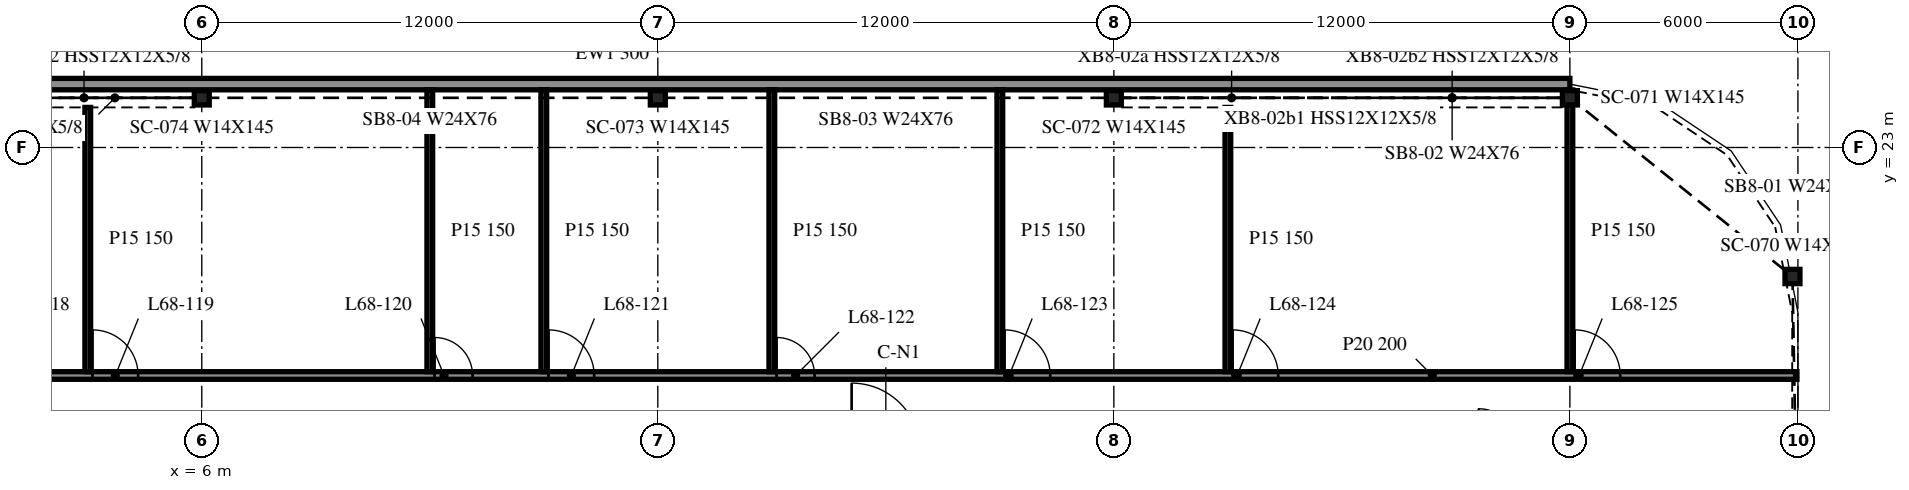
"""IFC4 building model, lengths in metres.
Left out: names, types, materials, properties, quantities, classifications, styles, units other than length and angle.
Written with IfcOpenShell. Run it as: python <this file> out.ifc"""

import sys

from ifc_helpers import new_model, si_unit, direction, frame, frame_2d, origin, origin_2d, place, context, subcontext, project, spatial, rectangle, i_section, extrude, element, fill, save


model = new_model("IFC4")
c1 = context("Model", 3, precision=1e-05, world=origin(), true_north=direction((0.0, 1.0)))
c2 = subcontext(c1, "Body", "Model", "MODEL_VIEW")
j1 = project(units=[si_unit("LENGTHUNIT", "METRE"), si_unit("PLANEANGLEUNIT", "RADIAN")], contexts=[c1])
p1 = place(None, origin())
s1 = spatial("IfcSite", under=j1, at=p1, CompositionType="ELEMENT")
p2 = place(p1, origin())
s2 = spatial("IfcBuilding", under=s1, at=p2, CompositionType="ELEMENT")
p3 = place(p2, frame((0.0, 0.0, 278.5)))
s3 = spatial("IfcBuildingStorey", under=s2, at=p3, CompositionType="ELEMENT", Elevation=278.5)
for number, where, z_axis, x_axis in (
    (1, (47.857, 19.605, -0.34), (0.0, 0.0, 1.0), (1.0, 0.0, 0.0)),
    (2, (42.0, 24.307, -0.34), (0.0, 0.0, 1.0), (1.0, 0.0, 0.0)),
    (3, (30.0, 24.307, -0.34), (0.0, 0.0, 1.0), (1.0, 0.0, 0.0)),
    (4, (18.0, 24.307, -0.34), (0.0, 0.0, 1.0), (1.0, 0.0, 0.0)),
    (5, (6.0, 24.307, -0.34), (0.0, 0.0, 1.0), (1.0, 0.0, 0.0)),
):
    element("IfcColumn", number, at=place(p3, frame(where, z_axis=z_axis, x_axis=x_axis)), inside=s3, PredefinedType="COLUMN", context=c2, shape_type="SweptSolid", body=[
        extrude(i_section(OverallWidth=0.394, OverallDepth=0.376, WebThickness=0.017, FlangeThickness=0.028, at=origin_2d()), origin(), (0.0, 0.0, 1.0), 3.8),
    ])
p4 = place(p3, frame((42.0, 24.668, 0.0), z_axis=(0.0, 0.0, 1.0), x_axis=(-1.0, 0.0, 0.0)))
e6 = element("IfcWall", 6, at=p4, inside=s3, PredefinedType="NOTDEFINED", context=c2, shape_type="SweptSolid", body=[
    extrude(rectangle(XDim=84.0, YDim=0.3, at=frame_2d((42.0, 0.0))), origin(), (0.0, 0.0, 1.0), 2.853),
])
p5 = place(p3, frame((-47.975, 17.0, 0.0), z_axis=(0.0, 0.0, 1.0), x_axis=(1.0, 0.0, 0.0)))
e7 = element("IfcWall", 7, at=p5, inside=s3, PredefinedType="PARTITIONING", context=c2, shape_type="SweptSolid", body=[
    extrude(rectangle(XDim=95.95, YDim=0.2, at=frame_2d((47.975, 0.0))), origin(), (0.0, 0.0, 1.0), 3.46),
])
p6 = place(p5, frame((7.3, 0.0, 0.0)))
e8 = element("IfcOpeningElement", 8, at=p6, cuts=e7, PredefinedType="OPENING", context=c2, shape_type="SweptSolid", body=[
    extrude(rectangle(XDim=1.2, YDim=2.1, at=frame_2d((0.6, 1.05))), frame((0.0, 0.11, 0.0), z_axis=(0.0, -1.0, 0.0), x_axis=(1.0, 0.0, 0.0)), (0.0, 0.0, 1.0), 0.22),
])
p7 = place(p5, frame((13.3, 0.0, 0.0)))
e9 = element("IfcOpeningElement", 9, at=p7, cuts=e7, PredefinedType="OPENING", context=c2, shape_type="SweptSolid", body=[
    extrude(rectangle(XDim=1.2, YDim=2.1, at=frame_2d((0.6, 1.05))), frame((0.0, 0.11, 0.0), z_axis=(0.0, -1.0, 0.0), x_axis=(1.0, 0.0, 0.0)), (0.0, 0.0, 1.0), 0.22),
])
p8 = place(p5, frame((19.3, 0.0, 0.0)))
e10 = element("IfcOpeningElement", 10, at=p8, cuts=e7, PredefinedType="OPENING", context=c2, shape_type="SweptSolid", body=[
    extrude(rectangle(XDim=1.2, YDim=2.1, at=frame_2d((0.6, 1.05))), frame((0.0, 0.11, 0.0), z_axis=(0.0, -1.0, 0.0), x_axis=(1.0, 0.0, 0.0)), (0.0, 0.0, 1.0), 0.22),
])
p9 = place(p5, frame((28.5, 0.0, 0.0)))
e11 = element("IfcOpeningElement", 11, at=p9, cuts=e7, PredefinedType="OPENING", context=c2, shape_type="SweptSolid", body=[
    extrude(rectangle(XDim=1.0, YDim=2.1, at=frame_2d((0.5, 1.05))), frame((0.0, 0.11, 0.0), z_axis=(0.0, -1.0, 0.0), x_axis=(1.0, 0.0, 0.0)), (0.0, 0.0, 1.0), 0.22),
])
p10 = place(p5, frame((31.3, 0.0, 0.0)))
e12 = element("IfcOpeningElement", 12, at=p10, cuts=e7, PredefinedType="OPENING", context=c2, shape_type="SweptSolid", body=[
    extrude(rectangle(XDim=1.2, YDim=2.1, at=frame_2d((0.6, 1.05))), frame((0.0, 0.11, 0.0), z_axis=(0.0, -1.0, 0.0), x_axis=(1.0, 0.0, 0.0)), (0.0, 0.0, 1.0), 0.22),
])
p11 = place(p5, frame((37.5, 0.0, 0.0)))
e13 = element("IfcOpeningElement", 13, at=p11, cuts=e7, PredefinedType="OPENING", context=c2, shape_type="SweptSolid", body=[
    extrude(rectangle(XDim=1.0, YDim=2.1, at=frame_2d((0.5, 1.05))), frame((0.0, 0.11, 0.0), z_axis=(0.0, -1.0, 0.0), x_axis=(1.0, 0.0, 0.0)), (0.0, 0.0, 1.0), 0.22),
])
p12 = place(p5, frame((43.3, 0.0, 0.0)))
e14 = element("IfcOpeningElement", 14, at=p12, cuts=e7, PredefinedType="OPENING", context=c2, shape_type="SweptSolid", body=[
    extrude(rectangle(XDim=1.2, YDim=2.1, at=frame_2d((0.6, 1.05))), frame((0.0, 0.11, 0.0), z_axis=(0.0, -1.0, 0.0), x_axis=(1.0, 0.0, 0.0)), (0.0, 0.0, 1.0), 0.22),
])
p13 = place(p5, frame((47.3, 0.0, 0.0)))
e15 = element("IfcOpeningElement", 15, at=p13, cuts=e7, PredefinedType="OPENING", context=c2, shape_type="SweptSolid", body=[
    extrude(rectangle(XDim=1.2, YDim=2.1, at=frame_2d((0.6, 1.05))), frame((0.0, 0.11, 0.0), z_axis=(0.0, -1.0, 0.0), x_axis=(1.0, 0.0, 0.0)), (0.0, 0.0, 1.0), 0.22),
])
p14 = place(p5, frame((51.1, 0.0, 0.0)))
e16 = element("IfcOpeningElement", 16, at=p14, cuts=e7, PredefinedType="OPENING", context=c2, shape_type="SweptSolid", body=[
    extrude(rectangle(XDim=1.2, YDim=2.1, at=frame_2d((0.6, 1.05))), frame((0.0, 0.11, 0.0), z_axis=(0.0, -1.0, 0.0), x_axis=(1.0, 0.0, 0.0)), (0.0, 0.0, 1.0), 0.22),
])
p15 = place(p5, frame((60.1, 0.0, 0.0)))
e17 = element("IfcOpeningElement", 17, at=p15, cuts=e7, PredefinedType="OPENING", context=c2, shape_type="SweptSolid", body=[
    extrude(rectangle(XDim=1.0, YDim=2.1, at=frame_2d((0.5, 1.05))), frame((0.0, 0.11, 0.0), z_axis=(0.0, -1.0, 0.0), x_axis=(1.0, 0.0, 0.0)), (0.0, 0.0, 1.0), 0.22),
])
p16 = place(p5, frame((63.1, 0.0, 0.0)))
e18 = element("IfcOpeningElement", 18, at=p16, cuts=e7, PredefinedType="OPENING", context=c2, shape_type="SweptSolid", body=[
    extrude(rectangle(XDim=1.2, YDim=2.1, at=frame_2d((0.6, 1.05))), frame((0.0, 0.11, 0.0), z_axis=(0.0, -1.0, 0.0), x_axis=(1.0, 0.0, 0.0)), (0.0, 0.0, 1.0), 0.22),
])
p17 = place(p5, frame((69.1, 0.0, 0.0)))
e19 = element("IfcOpeningElement", 19, at=p17, cuts=e7, PredefinedType="OPENING", context=c2, shape_type="SweptSolid", body=[
    extrude(rectangle(XDim=1.0, YDim=2.1, at=frame_2d((0.5, 1.05))), frame((0.0, 0.11, 0.0), z_axis=(0.0, -1.0, 0.0), x_axis=(1.0, 0.0, 0.0)), (0.0, 0.0, 1.0), 0.22),
])
p18 = place(p5, frame((75.1, 0.0, 0.0)))
e20 = element("IfcOpeningElement", 20, at=p18, cuts=e7, PredefinedType="OPENING", context=c2, shape_type="SweptSolid", body=[
    extrude(rectangle(XDim=1.2, YDim=2.1, at=frame_2d((0.6, 1.05))), frame((0.0, 0.11, 0.0), z_axis=(0.0, -1.0, 0.0), x_axis=(1.0, 0.0, 0.0)), (0.0, 0.0, 1.0), 0.22),
])
p19 = place(p5, frame((81.1, 0.0, 0.0)))
e21 = element("IfcOpeningElement", 21, at=p19, cuts=e7, PredefinedType="OPENING", context=c2, shape_type="SweptSolid", body=[
    extrude(rectangle(XDim=1.2, YDim=2.1, at=frame_2d((0.6, 1.05))), frame((0.0, 0.11, 0.0), z_axis=(0.0, -1.0, 0.0), x_axis=(1.0, 0.0, 0.0)), (0.0, 0.0, 1.0), 0.22),
])
p20 = place(p5, frame((90.1, 0.0, 0.0)))
e22 = element("IfcOpeningElement", 22, at=p20, cuts=e7, PredefinedType="OPENING", context=c2, shape_type="SweptSolid", body=[
    extrude(rectangle(XDim=1.2, YDim=2.1, at=frame_2d((0.6, 1.05))), frame((0.0, 0.11, 0.0), z_axis=(0.0, -1.0, 0.0), x_axis=(1.0, 0.0, 0.0)), (0.0, 0.0, 1.0), 0.22),
])
p21 = place(p3, frame((3.0, 17.1, 0.0), z_axis=(0.0, 0.0, 1.0), x_axis=(0.0, 1.0, 0.0)))
e23 = element("IfcWall", 23, at=p21, inside=s3, PredefinedType="PARTITIONING", context=c2, shape_type="SweptSolid", body=[
    extrude(rectangle(XDim=6.955, YDim=0.15, at=frame_2d((3.477, 0.0))), origin(), (0.0, 0.0, 1.0), 3.46),
])
for number, where, z_axis, x_axis in (
    (24, (12.0, 17.1, 0.0), (0.0, 0.0, 1.0), (0.0, 1.0, 0.0)),
    (25, (15.0, 17.1, 0.0), (0.0, 0.0, 1.0), (0.0, 1.0, 0.0)),
    (26, (21.0, 17.1, 0.0), (0.0, 0.0, 1.0), (0.0, 1.0, 0.0)),
    (27, (27.0, 17.1, 0.0), (0.0, 0.0, 1.0), (0.0, 1.0, 0.0)),
):
    element("IfcWall", number, at=place(p3, frame(where, z_axis=z_axis, x_axis=x_axis)), inside=s3, PredefinedType="PARTITIONING", context=c2, shape_type="SweptSolid", body=[
        extrude(rectangle(XDim=7.418, YDim=0.15, at=frame_2d((3.709, 0.0))), origin(), (0.0, 0.0, 1.0), 3.46),
    ])
p22 = place(p3, frame((33.0, 17.1, 0.0), z_axis=(0.0, 0.0, 1.0), x_axis=(0.0, 1.0, 0.0)))
e28 = element("IfcWall", 28, at=p22, inside=s3, PredefinedType="PARTITIONING", context=c2, shape_type="SweptSolid", body=[
    extrude(rectangle(XDim=6.955, YDim=0.15, at=frame_2d((3.477, 0.0))), origin(), (0.0, 0.0, 1.0), 3.46),
])
p23 = place(p3, frame((42.0, 17.1, 0.0), z_axis=(0.0, 0.0, 1.0), x_axis=(0.0, 1.0, 0.0)))
e29 = element("IfcWall", 29, at=p23, inside=s3, PredefinedType="PARTITIONING", context=c2, shape_type="SweptSolid", body=[
    extrude(rectangle(XDim=7.415, YDim=0.15, at=frame_2d((3.708, 0.0))), origin(), (0.0, 0.0, 1.0), 3.46),
])
p24 = place(p14, origin())
e30 = element("IfcDoor", 30, at=p24, inside=s3, OperationType="SINGLE_SWING_RIGHT", PredefinedType="DOOR", context=c2, shape_type="SweptSolid", body=[
    extrude(rectangle(XDim=1.2, YDim=2.1, at=frame_2d((0.6, 1.05))), frame((0.0, 0.025, 0.0), z_axis=(0.0, -1.0, 0.0), x_axis=(1.0, 0.0, 0.0)), (0.0, 0.0, 1.0), 0.05),
])
fill(e16, e30)
p25 = place(p15, origin())
e31 = element("IfcDoor", 31, at=p25, inside=s3, OperationType="SINGLE_SWING_RIGHT", PredefinedType="DOOR", context=c2, shape_type="SweptSolid", body=[
    extrude(rectangle(XDim=1.0, YDim=2.1, at=frame_2d((0.5, 1.05))), frame((0.0, 0.025, 0.0), z_axis=(0.0, -1.0, 0.0), x_axis=(1.0, 0.0, 0.0)), (0.0, 0.0, 1.0), 0.05),
])
fill(e17, e31)
p26 = place(p16, origin())
e32 = element("IfcDoor", 32, at=p26, inside=s3, OperationType="SINGLE_SWING_RIGHT", PredefinedType="DOOR", context=c2, shape_type="SweptSolid", body=[
    extrude(rectangle(XDim=1.2, YDim=2.1, at=frame_2d((0.6, 1.05))), frame((0.0, 0.025, 0.0), z_axis=(0.0, -1.0, 0.0), x_axis=(1.0, 0.0, 0.0)), (0.0, 0.0, 1.0), 0.05),
])
fill(e18, e32)
p27 = place(p17, origin())
e33 = element("IfcDoor", 33, at=p27, inside=s3, OperationType="SINGLE_SWING_RIGHT", PredefinedType="DOOR", context=c2, shape_type="SweptSolid", body=[
    extrude(rectangle(XDim=1.0, YDim=2.1, at=frame_2d((0.5, 1.05))), frame((0.0, 0.025, 0.0), z_axis=(0.0, -1.0, 0.0), x_axis=(1.0, 0.0, 0.0)), (0.0, 0.0, 1.0), 0.05),
])
fill(e19, e33)
p28 = place(p18, origin())
e34 = element("IfcDoor", 34, at=p28, inside=s3, OperationType="SINGLE_SWING_RIGHT", PredefinedType="DOOR", context=c2, shape_type="SweptSolid", body=[
    extrude(rectangle(XDim=1.2, YDim=2.1, at=frame_2d((0.6, 1.05))), frame((0.0, 0.025, 0.0), z_axis=(0.0, -1.0, 0.0), x_axis=(1.0, 0.0, 0.0)), (0.0, 0.0, 1.0), 0.05),
])
fill(e20, e34)
p29 = place(p19, origin())
e35 = element("IfcDoor", 35, at=p29, inside=s3, OperationType="SINGLE_SWING_RIGHT", PredefinedType="DOOR", context=c2, shape_type="SweptSolid", body=[
    extrude(rectangle(XDim=1.2, YDim=2.1, at=frame_2d((0.6, 1.05))), frame((0.0, 0.025, 0.0), z_axis=(0.0, -1.0, 0.0), x_axis=(1.0, 0.0, 0.0)), (0.0, 0.0, 1.0), 0.05),
])
fill(e21, e35)
p30 = place(p20, origin())
e36 = element("IfcDoor", 36, at=p30, inside=s3, OperationType="SINGLE_SWING_RIGHT", PredefinedType="DOOR", context=c2, shape_type="SweptSolid", body=[
    extrude(rectangle(XDim=1.2, YDim=2.1, at=frame_2d((0.6, 1.05))), frame((0.0, 0.025, 0.0), z_axis=(0.0, -1.0, 0.0), x_axis=(1.0, 0.0, 0.0)), (0.0, 0.0, 1.0), 0.05),
])
fill(e22, e36)
save(model, sys.argv[1])
